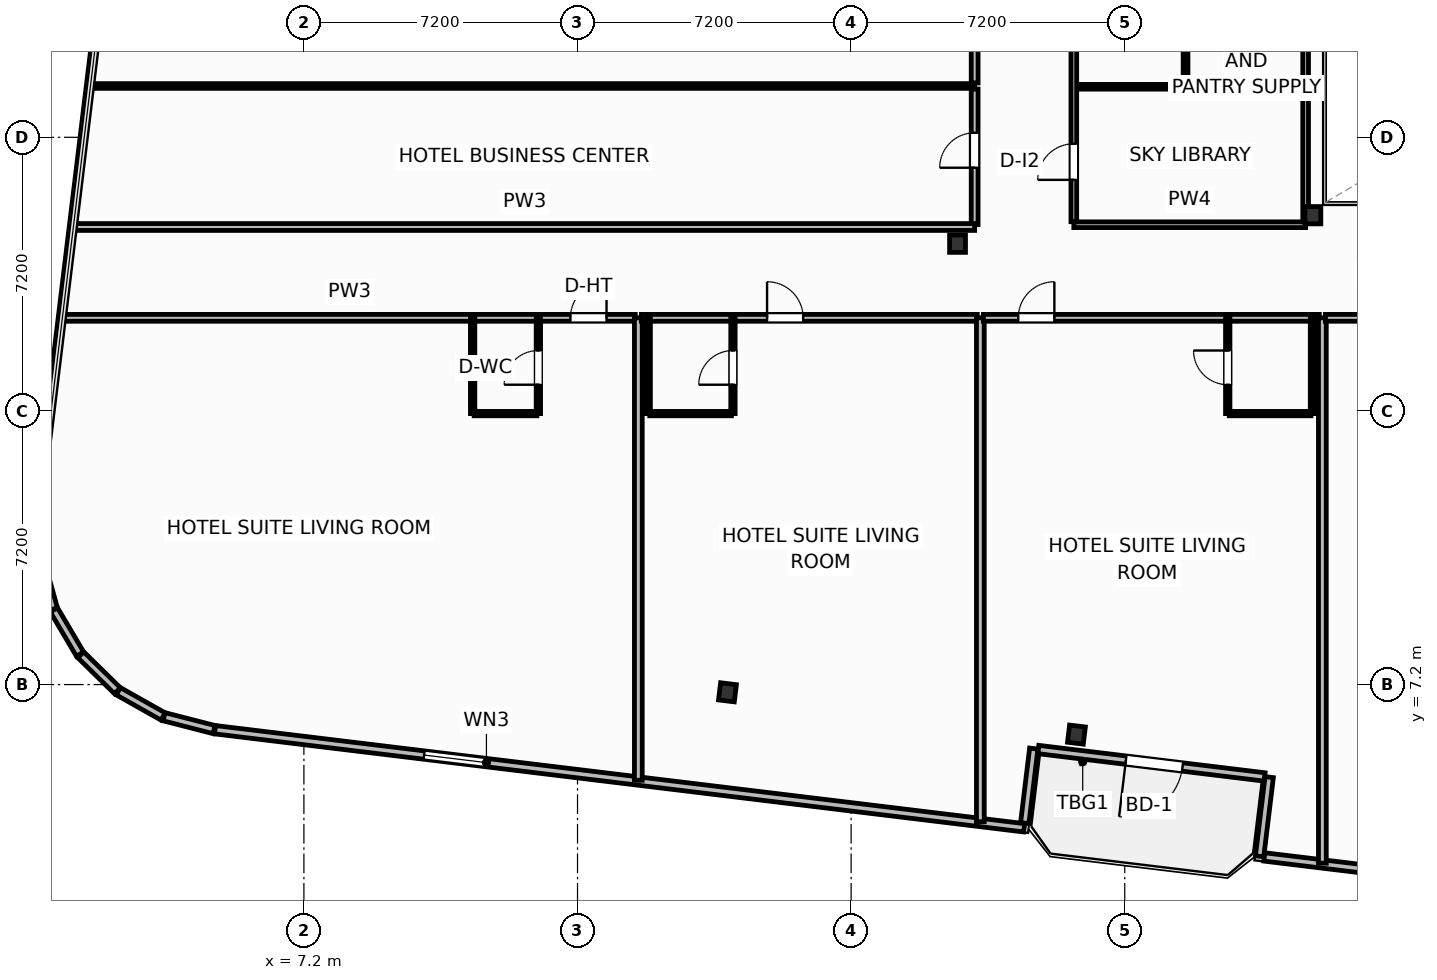
"""IFC4 building model, lengths in metres.
Left out: names, types, materials, properties, quantities, classifications, styles, units other than length and angle.
Written with IfcOpenShell. Run it as: python <this file> out.ifc"""

import sys

from ifc_helpers import new_model, si_unit, direction, frame, frame_2d, origin, origin_2d, place, context, subcontext, project, spatial, rectangle, i_section, extrude, element, fill, save


model = new_model("IFC4")
c1 = context("Model", 3, precision=1e-05, world=origin(), true_north=direction((0.0, 1.0)))
c2 = subcontext(c1, "Body", "Model", "MODEL_VIEW")
j1 = project(units=[si_unit("LENGTHUNIT", "METRE"), si_unit("PLANEANGLEUNIT", "RADIAN")], contexts=[c1])
p1 = place(None, origin())
s1 = spatial("IfcSite", under=j1, at=p1, CompositionType="ELEMENT")
p2 = place(p1, origin())
s2 = spatial("IfcBuilding", under=s1, at=p2, CompositionType="ELEMENT")
p3 = place(p2, frame((0.0, 0.0, 143.9)))
s3 = spatial("IfcBuildingStorey", under=s2, at=p3, CompositionType="ELEMENT", Elevation=143.9)
for number, where, z_axis, x_axis in (
    (1, (33.75, 19.55, 0.0), (0.0, 0.0, 1.0), (1.0, 0.0, 0.0)),
    (2, (24.4, 18.8, 0.0), (0.0, 0.0, 1.0), (1.0, 0.0, 0.0)),
    (3, (18.346, 6.997, 0.0), (0.0, 0.0, 1.0), (0.993, -0.12, 0.0)),
    (4, (27.529, 5.884, 0.0), (0.0, 0.0, 1.0), (0.993, -0.12, 0.0)),
):
    element("IfcColumn", number, at=place(p3, frame(where, z_axis=z_axis, x_axis=x_axis)), inside=s3, PredefinedType="COLUMN", context=c2, shape_type="SweptSolid", body=[
        extrude(i_section(OverallWidth=0.418, OverallDepth=0.455, WebThickness=0.042, FlangeThickness=0.068, FilletRadius=0.025, at=origin_2d()), origin(), (0.0, 0.0, 1.0), 3.7),
    ])
p4 = place(p3, frame((32.48, 4.77, 0.0), z_axis=(0.0, 0.0, 1.0), x_axis=(-0.992735402148, 0.120318000826, 0.0)))
e5 = element("IfcWall", 5, at=p4, inside=s3, PredefinedType="SOLIDWALL", context=c2, shape_type="SweptSolid", body=[
    extrude(rectangle(XDim=6.0, YDim=0.22, at=frame_2d((3.0, 0.0))), origin(), (0.0, 0.0, 1.0), 2.73),
])
p5 = place(p4, frame((2.176, 0.0, 0.0)))
e6 = element("IfcOpeningElement", 6, at=p5, cuts=e5, PredefinedType="OPENING", context=c2, shape_type="SweptSolid", body=[
    extrude(rectangle(XDim=1.5, YDim=2.25, at=frame_2d((0.75, 1.125))), frame((0.0, 0.12, 0.0), z_axis=(0.0, -1.0, 0.0), x_axis=(1.0, 0.0, 0.0)), (0.0, 0.0, 1.0), 0.24),
])
p6 = place(p3, frame((0.245, 10.491, 0.0), z_axis=(0.0, 0.0, 1.0), x_axis=(0.268853470153, -0.963181089716, 0.0)))
e7 = element("IfcWall", 7, at=p6, inside=s3, PredefinedType="SOLIDWALL", context=c2, shape_type="SweptSolid", body=[
    extrude(rectangle(XDim=1.353, YDim=0.22, at=frame_2d((0.677, 0.0))), origin(), (0.0, 0.0, 1.0), 2.73),
])
p7 = place(p3, frame((0.622, 9.166, 0.0), z_axis=(0.0, 0.0, 1.0), x_axis=(0.508911700393, -0.860818727261, 0.0)))
e8 = element("IfcWall", 8, at=p7, inside=s3, PredefinedType="SOLIDWALL", context=c2, shape_type="SweptSolid", body=[
    extrude(rectangle(XDim=1.353, YDim=0.22, at=frame_2d((0.676, 0.0))), origin(), (0.0, 0.0, 1.0), 2.73),
])
p8 = place(p3, frame((1.328, 7.984, 0.0), z_axis=(0.0, 0.0, 1.0), x_axis=(0.714376989847, -0.69976104234, 0.0)))
e9 = element("IfcWall", 9, at=p8, inside=s3, PredefinedType="SOLIDWALL", context=c2, shape_type="SweptSolid", body=[
    extrude(rectangle(XDim=1.353, YDim=0.22, at=frame_2d((0.677, 0.0))), origin(), (0.0, 0.0, 1.0), 2.73),
])
p9 = place(p3, frame((2.316, 7.025, 0.0), z_axis=(0.0, 0.0, 1.0), x_axis=(0.87113677592, -0.491040443996, 0.0)))
e10 = element("IfcWall", 10, at=p9, inside=s3, PredefinedType="SOLIDWALL", context=c2, shape_type="SweptSolid", body=[
    extrude(rectangle(XDim=1.353, YDim=0.22, at=frame_2d((0.677, 0.0))), origin(), (0.0, 0.0, 1.0), 2.73),
])
p10 = place(p3, frame((3.519, 6.354, 0.0), z_axis=(0.0, 0.0, 1.0), x_axis=(0.968506529347, -0.248988157573, 0.0)))
e11 = element("IfcWall", 11, at=p10, inside=s3, PredefinedType="SOLIDWALL", context=c2, shape_type="SweptSolid", body=[
    extrude(rectangle(XDim=1.361, YDim=0.22, at=frame_2d((0.681, 0.0))), origin(), (0.0, 0.0, 1.0), 2.73),
])
p11 = place(p3, frame((4.862, 6.012, 0.0), z_axis=(0.0, 0.0, 1.0), x_axis=(0.99273213367, -0.120344965739, 0.0)))
e12 = element("IfcWall", 12, at=p11, inside=s3, PredefinedType="SOLIDWALL", context=c2, shape_type="SweptSolid", body=[
    extrude(rectangle(XDim=21.447, YDim=0.22, at=frame_2d((10.724, 0.0))), origin(), (0.0, 0.0, 1.0), 2.73),
])
p12 = place(p11, frame((5.543, 0.0, 0.8)))
e13 = element("IfcOpeningElement", 13, at=p12, cuts=e12, PredefinedType="OPENING", context=c2, shape_type="SweptSolid", body=[
    extrude(rectangle(XDim=1.65, YDim=1.65, at=frame_2d((0.825, 0.825))), frame((0.0, 0.12, 0.0), z_axis=(0.0, -1.0, 0.0), x_axis=(1.0, 0.0, 0.0)), (0.0, 0.0, 1.0), 0.24),
])
p13 = place(p3, frame((26.168, 3.555, 0.0), z_axis=(0.0, 0.0, 1.0), x_axis=(0.120290754542, 0.992738703976, 0.0)))
e14 = element("IfcWall", 14, at=p13, inside=s3, PredefinedType="SOLIDWALL", context=c2, shape_type="SweptSolid", body=[
    extrude(rectangle(XDim=1.975, YDim=0.22, at=frame_2d((0.987, 0.0))), origin(), (0.0, 0.0, 1.0), 2.73),
])
p14 = place(p3, frame((32.601, 4.765, 0.0), z_axis=(0.0, 0.0, 1.0), x_axis=(-0.120327895535, -0.992734202874, 0.0)))
e15 = element("IfcWall", 15, at=p14, inside=s3, PredefinedType="SOLIDWALL", context=c2, shape_type="SweptSolid", body=[
    extrude(rectangle(XDim=2.1, YDim=0.22, at=frame_2d((1.05, 0.0))), origin(), (0.0, 0.0, 1.0), 2.73),
])
p15 = place(p3, frame((32.472, 2.665, 0.0), z_axis=(0.0, 0.0, 1.0), x_axis=(0.992734661931, -0.120324108143, 0.0)))
e16 = element("IfcWall", 16, at=p15, inside=s3, PredefinedType="SOLIDWALL", context=c2, shape_type="SweptSolid", body=[
    extrude(rectangle(XDim=8.035, YDim=0.22, at=frame_2d((4.018, 0.0))), origin(), (0.0, 0.0, 1.0), 2.73),
])
p16 = place(p15, frame((3.192, 0.0, 0.8)))
e17 = element("IfcOpeningElement", 17, at=p16, cuts=e16, PredefinedType="OPENING", context=c2, shape_type="SweptSolid", body=[
    extrude(rectangle(XDim=1.65, YDim=1.65, at=frame_2d((0.825, 0.825))), frame((0.0, 0.12, 0.0), z_axis=(0.0, -1.0, 0.0), x_axis=(1.0, 0.0, 0.0)), (0.0, 0.0, 1.0), 0.24),
])
p17 = place(p3, frame((0.884, 16.85, 0.0), z_axis=(0.0, 0.0, 1.0), x_axis=(1.0, 0.0, 0.0)))
e18 = element("IfcWall", 18, at=p17, inside=s3, PredefinedType="PARTITIONING", context=c2, shape_type="SweptSolid", body=[
    extrude(rectangle(XDim=15.036, YDim=0.18, at=frame_2d((7.518, 0.0))), origin(), (0.0, 0.0, 1.0), 3.45),
])
p18 = place(p17, frame((13.329, 0.0, 0.0)))
e19 = element("IfcOpeningElement", 19, at=p18, cuts=e18, PredefinedType="OPENING", context=c2, shape_type="SweptSolid", body=[
    extrude(rectangle(XDim=0.95, YDim=2.15, at=frame_2d((0.475, 1.075))), frame((0.0, 0.1, 0.0), z_axis=(0.0, -1.0, 0.0), x_axis=(1.0, 0.0, 0.0)), (0.0, 0.0, 1.0), 0.2),
])
p19 = place(p3, frame((11.68, 14.33, 0.0), z_axis=(0.0, 0.0, 1.0), x_axis=(1.0, 0.0, 0.0)))
e20 = element("IfcWall", 20, at=p19, inside=s3, PredefinedType="PARTITIONING", context=c2, shape_type="SweptSolid", body=[
    extrude(rectangle(XDim=1.65, YDim=0.115, at=frame_2d((0.825, 0.0))), origin(), (0.0, 0.0, 1.0), 3.45),
])
p20 = place(p3, frame((13.37, 14.33, 0.0), z_axis=(0.0, 0.0, 1.0), x_axis=(0.0, 1.0, 0.0)))
e21 = element("IfcWall", 21, at=p20, inside=s3, PredefinedType="PARTITIONING", context=c2, shape_type="SweptSolid", body=[
    extrude(rectangle(XDim=2.52, YDim=0.115, at=frame_2d((1.26, 0.0))), origin(), (0.0, 0.0, 1.0), 3.45),
])
p21 = place(p20, frame((0.76, 0.0, 0.0)))
e22 = element("IfcOpeningElement", 22, at=p21, cuts=e21, PredefinedType="OPENING", context=c2, shape_type="SweptSolid", body=[
    extrude(rectangle(XDim=0.9, YDim=2.05, at=frame_2d((0.45, 1.025))), frame((0.0, 0.067, 0.0), z_axis=(0.0, -1.0, 0.0), x_axis=(1.0, 0.0, 0.0)), (0.0, 0.0, 1.0), 0.135),
])
p22 = place(p3, frame((11.64, 14.33, 0.0), z_axis=(0.0, 0.0, 1.0), x_axis=(0.0, 1.0, 0.0)))
e23 = element("IfcWall", 23, at=p22, inside=s3, PredefinedType="PARTITIONING", context=c2, shape_type="SweptSolid", body=[
    extrude(rectangle(XDim=2.52, YDim=0.115, at=frame_2d((1.26, 0.0))), origin(), (0.0, 0.0, 1.0), 3.45),
])
p23 = place(p3, frame((16.0, 4.682, 0.0), z_axis=(0.0, 0.0, 1.0), x_axis=(0.0, 1.0, 0.0)))
e24 = element("IfcWall", 24, at=p23, inside=s3, PredefinedType="PARTITIONING", context=c2, shape_type="SweptSolid", body=[
    extrude(rectangle(XDim=12.168, YDim=0.205, at=frame_2d((6.084, 0.0))), origin(), (0.0, 0.0, 1.0), 3.45),
])
p24 = place(p3, frame((16.08, 16.85, 0.0), z_axis=(0.0, 0.0, 1.0), x_axis=(1.0, 0.0, 0.0)))
e25 = element("IfcWall", 25, at=p24, inside=s3, PredefinedType="PARTITIONING", context=c2, shape_type="SweptSolid", body=[
    extrude(rectangle(XDim=8.84, YDim=0.18, at=frame_2d((4.42, 0.0))), origin(), (0.0, 0.0, 1.0), 3.45),
])
p25 = place(p24, frame((3.308, 0.0, 0.0)))
e26 = element("IfcOpeningElement", 26, at=p25, cuts=e25, PredefinedType="OPENING", context=c2, shape_type="SweptSolid", body=[
    extrude(rectangle(XDim=0.95, YDim=2.15, at=frame_2d((0.475, 1.075))), frame((0.0, 0.1, 0.0), z_axis=(0.0, -1.0, 0.0), x_axis=(1.0, 0.0, 0.0)), (0.0, 0.0, 1.0), 0.2),
])
p26 = place(p3, frame((16.3, 14.33, 0.0), z_axis=(0.0, 0.0, 1.0), x_axis=(1.0, 0.0, 0.0)))
e27 = element("IfcWall", 27, at=p26, inside=s3, PredefinedType="PARTITIONING", context=c2, shape_type="SweptSolid", body=[
    extrude(rectangle(XDim=2.15, YDim=0.115, at=frame_2d((1.075, 0.0))), origin(), (0.0, 0.0, 1.0), 3.45),
])
p27 = place(p3, frame((18.49, 14.33, 0.0), z_axis=(0.0, 0.0, 1.0), x_axis=(0.0, 1.0, 0.0)))
e28 = element("IfcWall", 28, at=p27, inside=s3, PredefinedType="PARTITIONING", context=c2, shape_type="SweptSolid", body=[
    extrude(rectangle(XDim=2.52, YDim=0.115, at=frame_2d((1.26, 0.0))), origin(), (0.0, 0.0, 1.0), 3.45),
])
p28 = place(p27, frame((0.76, 0.0, 0.0)))
e29 = element("IfcOpeningElement", 29, at=p28, cuts=e28, PredefinedType="OPENING", context=c2, shape_type="SweptSolid", body=[
    extrude(rectangle(XDim=0.9, YDim=2.05, at=frame_2d((0.45, 1.025))), frame((0.0, 0.067, 0.0), z_axis=(0.0, -1.0, 0.0), x_axis=(1.0, 0.0, 0.0)), (0.0, 0.0, 1.0), 0.135),
])
p29 = place(p3, frame((16.26, 14.33, 0.0), z_axis=(0.0, 0.0, 1.0), x_axis=(0.0, 1.0, 0.0)))
e30 = element("IfcWall", 30, at=p29, inside=s3, PredefinedType="PARTITIONING", context=c2, shape_type="SweptSolid", body=[
    extrude(rectangle(XDim=2.52, YDim=0.115, at=frame_2d((1.26, 0.0))), origin(), (0.0, 0.0, 1.0), 3.45),
])
p30 = place(p3, frame((25.0, 3.591, 0.0), z_axis=(0.0, 0.0, 1.0), x_axis=(0.0, 1.0, 0.0)))
e31 = element("IfcWall", 31, at=p30, inside=s3, PredefinedType="PARTITIONING", context=c2, shape_type="SweptSolid", body=[
    extrude(rectangle(XDim=13.259, YDim=0.205, at=frame_2d((6.629, 0.0))), origin(), (0.0, 0.0, 1.0), 2.662),
])
p31 = place(p3, frame((25.08, 16.85, 0.0), z_axis=(0.0, 0.0, 1.0), x_axis=(1.0, 0.0, 0.0)))
e32 = element("IfcWall", 32, at=p31, inside=s3, PredefinedType="PARTITIONING", context=c2, shape_type="SweptSolid", body=[
    extrude(rectangle(XDim=8.84, YDim=0.18, at=frame_2d((4.42, 0.0))), origin(), (0.0, 0.0, 1.0), 3.45),
])
p32 = place(p31, frame((0.918, 0.0, 0.0)))
e33 = element("IfcOpeningElement", 33, at=p32, cuts=e32, PredefinedType="OPENING", context=c2, shape_type="SweptSolid", body=[
    extrude(rectangle(XDim=0.95, YDim=2.15, at=frame_2d((0.475, 1.075))), frame((0.0, 0.1, 0.0), z_axis=(0.0, -1.0, 0.0), x_axis=(1.0, 0.0, 0.0)), (0.0, 0.0, 1.0), 0.2),
])
p33 = place(p3, frame((31.55, 14.33, 0.0), z_axis=(0.0, 0.0, 1.0), x_axis=(1.0, 0.0, 0.0)))
e34 = element("IfcWall", 34, at=p33, inside=s3, PredefinedType="PARTITIONING", context=c2, shape_type="SweptSolid", body=[
    extrude(rectangle(XDim=2.15, YDim=0.115, at=frame_2d((1.075, 0.0))), origin(), (0.0, 0.0, 1.0), 3.45),
])
p34 = place(p3, frame((31.51, 14.33, 0.0), z_axis=(0.0, 0.0, 1.0), x_axis=(0.0, 1.0, 0.0)))
e35 = element("IfcWall", 35, at=p34, inside=s3, PredefinedType="PARTITIONING", context=c2, shape_type="SweptSolid", body=[
    extrude(rectangle(XDim=2.52, YDim=0.115, at=frame_2d((1.26, 0.0))), origin(), (0.0, 0.0, 1.0), 3.45),
])
p35 = place(p34, frame((0.76, 0.0, 0.0)))
e36 = element("IfcOpeningElement", 36, at=p35, cuts=e35, PredefinedType="OPENING", context=c2, shape_type="SweptSolid", body=[
    extrude(rectangle(XDim=0.9, YDim=2.05, at=frame_2d((0.45, 1.025))), frame((0.0, 0.067, 0.0), z_axis=(0.0, -1.0, 0.0), x_axis=(1.0, 0.0, 0.0)), (0.0, 0.0, 1.0), 0.135),
])
p36 = place(p3, frame((33.74, 14.33, 0.0), z_axis=(0.0, 0.0, 1.0), x_axis=(0.0, 1.0, 0.0)))
e37 = element("IfcWall", 37, at=p36, inside=s3, PredefinedType="PARTITIONING", context=c2, shape_type="SweptSolid", body=[
    extrude(rectangle(XDim=2.52, YDim=0.115, at=frame_2d((1.26, 0.0))), origin(), (0.0, 0.0, 1.0), 3.45),
])
p37 = place(p3, frame((34.0, 2.5, 0.0), z_axis=(0.0, 0.0, 1.0), x_axis=(0.0, 1.0, 0.0)))
e38 = element("IfcWall", 38, at=p37, inside=s3, PredefinedType="PARTITIONING", context=c2, shape_type="SweptSolid", body=[
    extrude(rectangle(XDim=14.35, YDim=0.205, at=frame_2d((7.175, 0.0))), origin(), (0.0, 0.0, 1.0), 3.45),
])
p38 = place(p3, frame((34.08, 16.85, 0.0), z_axis=(0.0, 0.0, 1.0), x_axis=(1.0, 0.0, 0.0)))
e39 = element("IfcWall", 39, at=p38, inside=s3, PredefinedType="PARTITIONING", context=c2, shape_type="SweptSolid", body=[
    extrude(rectangle(XDim=8.84, YDim=0.18, at=frame_2d((4.42, 0.0))), origin(), (0.0, 0.0, 1.0), 3.45),
])
p39 = place(p38, frame((0.918, 0.0, 0.0)))
e40 = element("IfcOpeningElement", 40, at=p39, cuts=e39, PredefinedType="OPENING", context=c2, shape_type="SweptSolid", body=[
    extrude(rectangle(XDim=0.95, YDim=2.15, at=frame_2d((0.475, 1.075))), frame((0.0, 0.1, 0.0), z_axis=(0.0, -1.0, 0.0), x_axis=(1.0, 0.0, 0.0)), (0.0, 0.0, 1.0), 0.2),
])
p40 = place(p3, frame((24.85, 19.3, 0.0), z_axis=(0.0, 0.0, 1.0), x_axis=(0.0, 1.0, 0.0)))
e41 = element("IfcWall", 41, at=p40, inside=s3, PredefinedType="PARTITIONING", context=c2, shape_type="SweptSolid", body=[
    extrude(rectangle(XDim=3.57, YDim=0.18, at=frame_2d((1.785, 0.0))), origin(), (0.0, 0.0, 1.0), 3.45),
])
p41 = place(p40, frame((1.5, 0.0, 0.0)))
e42 = element("IfcOpeningElement", 42, at=p41, cuts=e41, PredefinedType="OPENING", context=c2, shape_type="SweptSolid", body=[
    extrude(rectangle(XDim=0.92, YDim=2.05, at=frame_2d((0.46, 1.025))), frame((0.0, 0.1, 0.0), z_axis=(0.0, -1.0, 0.0), x_axis=(1.0, 0.0, 0.0)), (0.0, 0.0, 1.0), 0.2),
])
p42 = place(p3, frame((24.85, 23.03, 0.0), z_axis=(0.0, 0.0, 1.0), x_axis=(0.0, 1.0, 0.0)))
e43 = element("IfcWall", 43, at=p42, inside=s3, PredefinedType="PARTITIONING", context=c2, shape_type="SweptSolid", body=[
    extrude(rectangle(XDim=3.57, YDim=0.18, at=frame_2d((1.785, 0.0))), origin(), (0.0, 0.0, 1.0), 3.45),
])
p43 = place(p42, frame((1.5, 0.0, 0.0)))
e44 = element("IfcOpeningElement", 44, at=p43, cuts=e43, PredefinedType="OPENING", context=c2, shape_type="SweptSolid", body=[
    extrude(rectangle(XDim=0.92, YDim=2.05, at=frame_2d((0.46, 1.025))), frame((0.0, 0.1, 0.0), z_axis=(0.0, -1.0, 0.0), x_axis=(1.0, 0.0, 0.0)), (0.0, 0.0, 1.0), 0.2),
])
p44 = place(p3, frame((1.624, 22.95, 0.0), z_axis=(0.0, 0.0, 1.0), x_axis=(1.0, 0.0, 0.0)))
e45 = element("IfcWall", 45, at=p44, inside=s3, PredefinedType="PARTITIONING", context=c2, shape_type="SweptSolid", body=[
    extrude(rectangle(XDim=23.226, YDim=0.125, at=frame_2d((11.613, 0.0))), origin(), (0.0, 0.0, 1.0), 3.45),
])
p45 = place(p3, frame((1.174, 19.24, 0.0), z_axis=(0.0, 0.0, 1.0), x_axis=(1.0, 0.0, 0.0)))
e46 = element("IfcWall", 46, at=p45, inside=s3, PredefinedType="PARTITIONING", context=c2, shape_type="SweptSolid", body=[
    extrude(rectangle(XDim=23.676, YDim=0.18, at=frame_2d((11.838, 0.0))), origin(), (0.0, 0.0, 1.0), 3.45),
])
p46 = place(p3, frame((27.46, 19.3, 0.0), z_axis=(0.0, 0.0, 1.0), x_axis=(1.0, 0.0, 0.0)))
e47 = element("IfcWall", 47, at=p46, inside=s3, PredefinedType="PARTITIONING", context=c2, shape_type="SweptSolid", body=[
    extrude(rectangle(XDim=6.1, YDim=0.15, at=frame_2d((3.05, 0.0))), origin(), (0.0, 0.0, 1.0), 2.662),
])
p47 = place(p3, frame((27.52, 22.93, 0.0), z_axis=(0.0, 0.0, 1.0), x_axis=(1.0, 0.0, 0.0)))
e48 = element("IfcWall", 48, at=p47, inside=s3, PredefinedType="PARTITIONING", context=c2, shape_type="SweptSolid", body=[
    extrude(rectangle(XDim=6.0, YDim=0.125, at=frame_2d((3.0, 0.0))), origin(), (0.0, 0.0, 1.0), 3.45),
])
p48 = place(p3, frame((30.4, 23.0, 0.0), z_axis=(0.0, 0.0, 1.0), x_axis=(0.0, 1.0, 0.0)))
e49 = element("IfcWall", 49, at=p48, inside=s3, PredefinedType="PARTITIONING", context=c2, shape_type="SweptSolid", body=[
    extrude(rectangle(XDim=3.54, YDim=0.125, at=frame_2d((1.77, 0.0))), origin(), (0.0, 0.0, 1.0), 3.45),
])
p49 = place(p3, frame((27.46, 19.38, 0.0), z_axis=(0.0, 0.0, 1.0), x_axis=(0.0, 1.0, 0.0)))
e50 = element("IfcWall", 50, at=p49, inside=s3, PredefinedType="PARTITIONING", context=c2, shape_type="SweptSolid", body=[
    extrude(rectangle(XDim=7.16, YDim=0.15, at=frame_2d((3.58, 0.0))), origin(), (0.0, 0.0, 1.0), 3.45),
])
p50 = place(p49, frame((1.1, 0.0, 0.0)))
e51 = element("IfcOpeningElement", 51, at=p50, cuts=e50, PredefinedType="OPENING", context=c2, shape_type="SweptSolid", body=[
    extrude(rectangle(XDim=0.95, YDim=2.05, at=frame_2d((0.475, 1.025))), frame((0.0, 0.085, 0.0), z_axis=(0.0, -1.0, 0.0), x_axis=(1.0, 0.0, 0.0)), (0.0, 0.0, 1.0), 0.17),
])
p51 = place(p3, frame((33.56, 19.38, 0.0), z_axis=(0.0, 0.0, 1.0), x_axis=(0.0, 1.0, 0.0)))
e52 = element("IfcWall", 52, at=p51, inside=s3, PredefinedType="PARTITIONING", context=c2, shape_type="SweptSolid", body=[
    extrude(rectangle(XDim=7.16, YDim=0.15, at=frame_2d((3.58, 0.0))), origin(), (0.0, 0.0, 1.0), 2.824),
])
p52 = place(p5, origin())
e53 = element("IfcDoor", 53, at=p52, inside=s3, OperationType="SINGLE_SWING_RIGHT", PredefinedType="DOOR", context=c2, shape_type="SweptSolid", body=[
    extrude(rectangle(XDim=1.5, YDim=2.25, at=frame_2d((0.75, 1.125))), frame((0.0, 0.025, 0.0), z_axis=(0.0, -1.0, 0.0), x_axis=(1.0, 0.0, 0.0)), (0.0, 0.0, 1.0), 0.05),
])
fill(e6, e53)
p53 = place(p12, origin())
e54 = element("IfcWindow", 54, at=p53, inside=s3, PartitioningType="SINGLE_PANEL", PredefinedType="WINDOW", context=c2, shape_type="SweptSolid", body=[
    extrude(rectangle(XDim=1.65, YDim=1.65, at=frame_2d((0.825, 0.825))), frame((0.0, 0.03, 0.0), z_axis=(0.0, -1.0, 0.0), x_axis=(1.0, 0.0, 0.0)), (0.0, 0.0, 1.0), 0.06),
])
fill(e13, e54)
p54 = place(p18, origin())
e55 = element("IfcDoor", 55, at=p54, inside=s3, OperationType="SINGLE_SWING_RIGHT", PredefinedType="DOOR", context=c2, shape_type="SweptSolid", body=[
    extrude(rectangle(XDim=0.95, YDim=2.15, at=frame_2d((0.475, 1.075))), frame((0.0, 0.025, 0.0), z_axis=(0.0, -1.0, 0.0), x_axis=(1.0, 0.0, 0.0)), (0.0, 0.0, 1.0), 0.05),
])
fill(e19, e55)
p55 = place(p21, origin())
e56 = element("IfcDoor", 56, at=p55, inside=s3, OperationType="SINGLE_SWING_LEFT", PredefinedType="DOOR", context=c2, shape_type="SweptSolid", body=[
    extrude(rectangle(XDim=0.9, YDim=2.05, at=frame_2d((0.45, 1.025))), frame((0.0, 0.025, 0.0), z_axis=(0.0, -1.0, 0.0), x_axis=(1.0, 0.0, 0.0)), (0.0, 0.0, 1.0), 0.05),
])
fill(e22, e56)
p56 = place(p25, origin())
e57 = element("IfcDoor", 57, at=p56, inside=s3, OperationType="SINGLE_SWING_LEFT", PredefinedType="DOOR", context=c2, shape_type="SweptSolid", body=[
    extrude(rectangle(XDim=0.95, YDim=2.15, at=frame_2d((0.475, 1.075))), frame((0.0, 0.025, 0.0), z_axis=(0.0, -1.0, 0.0), x_axis=(1.0, 0.0, 0.0)), (0.0, 0.0, 1.0), 0.05),
])
fill(e26, e57)
p57 = place(p28, origin())
e58 = element("IfcDoor", 58, at=p57, inside=s3, OperationType="SINGLE_SWING_LEFT", PredefinedType="DOOR", context=c2, shape_type="SweptSolid", body=[
    extrude(rectangle(XDim=0.9, YDim=2.05, at=frame_2d((0.45, 1.025))), frame((0.0, 0.025, 0.0), z_axis=(0.0, -1.0, 0.0), x_axis=(1.0, 0.0, 0.0)), (0.0, 0.0, 1.0), 0.05),
])
fill(e29, e58)
p58 = place(p32, origin())
e59 = element("IfcDoor", 59, at=p58, inside=s3, OperationType="SINGLE_SWING_RIGHT", PredefinedType="DOOR", context=c2, shape_type="SweptSolid", body=[
    extrude(rectangle(XDim=0.95, YDim=2.15, at=frame_2d((0.475, 1.075))), frame((0.0, 0.025, 0.0), z_axis=(0.0, -1.0, 0.0), x_axis=(1.0, 0.0, 0.0)), (0.0, 0.0, 1.0), 0.05),
])
fill(e33, e59)
p59 = place(p35, origin())
e60 = element("IfcDoor", 60, at=p59, inside=s3, OperationType="SINGLE_SWING_RIGHT", PredefinedType="DOOR", context=c2, shape_type="SweptSolid", body=[
    extrude(rectangle(XDim=0.9, YDim=2.05, at=frame_2d((0.45, 1.025))), frame((0.0, 0.025, 0.0), z_axis=(0.0, -1.0, 0.0), x_axis=(1.0, 0.0, 0.0)), (0.0, 0.0, 1.0), 0.05),
])
fill(e36, e60)
p60 = place(p41, origin())
e61 = element("IfcDoor", 61, at=p60, inside=s3, OperationType="SINGLE_SWING_LEFT", PredefinedType="DOOR", context=c2, shape_type="SweptSolid", body=[
    extrude(rectangle(XDim=0.92, YDim=2.05, at=frame_2d((0.46, 1.025))), frame((0.0, 0.025, 0.0), z_axis=(0.0, -1.0, 0.0), x_axis=(1.0, 0.0, 0.0)), (0.0, 0.0, 1.0), 0.05),
])
fill(e42, e61)
p61 = place(p50, origin())
e62 = element("IfcDoor", 62, at=p61, inside=s3, OperationType="SINGLE_SWING_LEFT", PredefinedType="DOOR", context=c2, shape_type="SweptSolid", body=[
    extrude(rectangle(XDim=0.95, YDim=2.05, at=frame_2d((0.475, 1.025))), frame((0.0, 0.025, 0.0), z_axis=(0.0, -1.0, 0.0), x_axis=(1.0, 0.0, 0.0)), (0.0, 0.0, 1.0), 0.05),
])
fill(e51, e62)
save(model, sys.argv[1])
